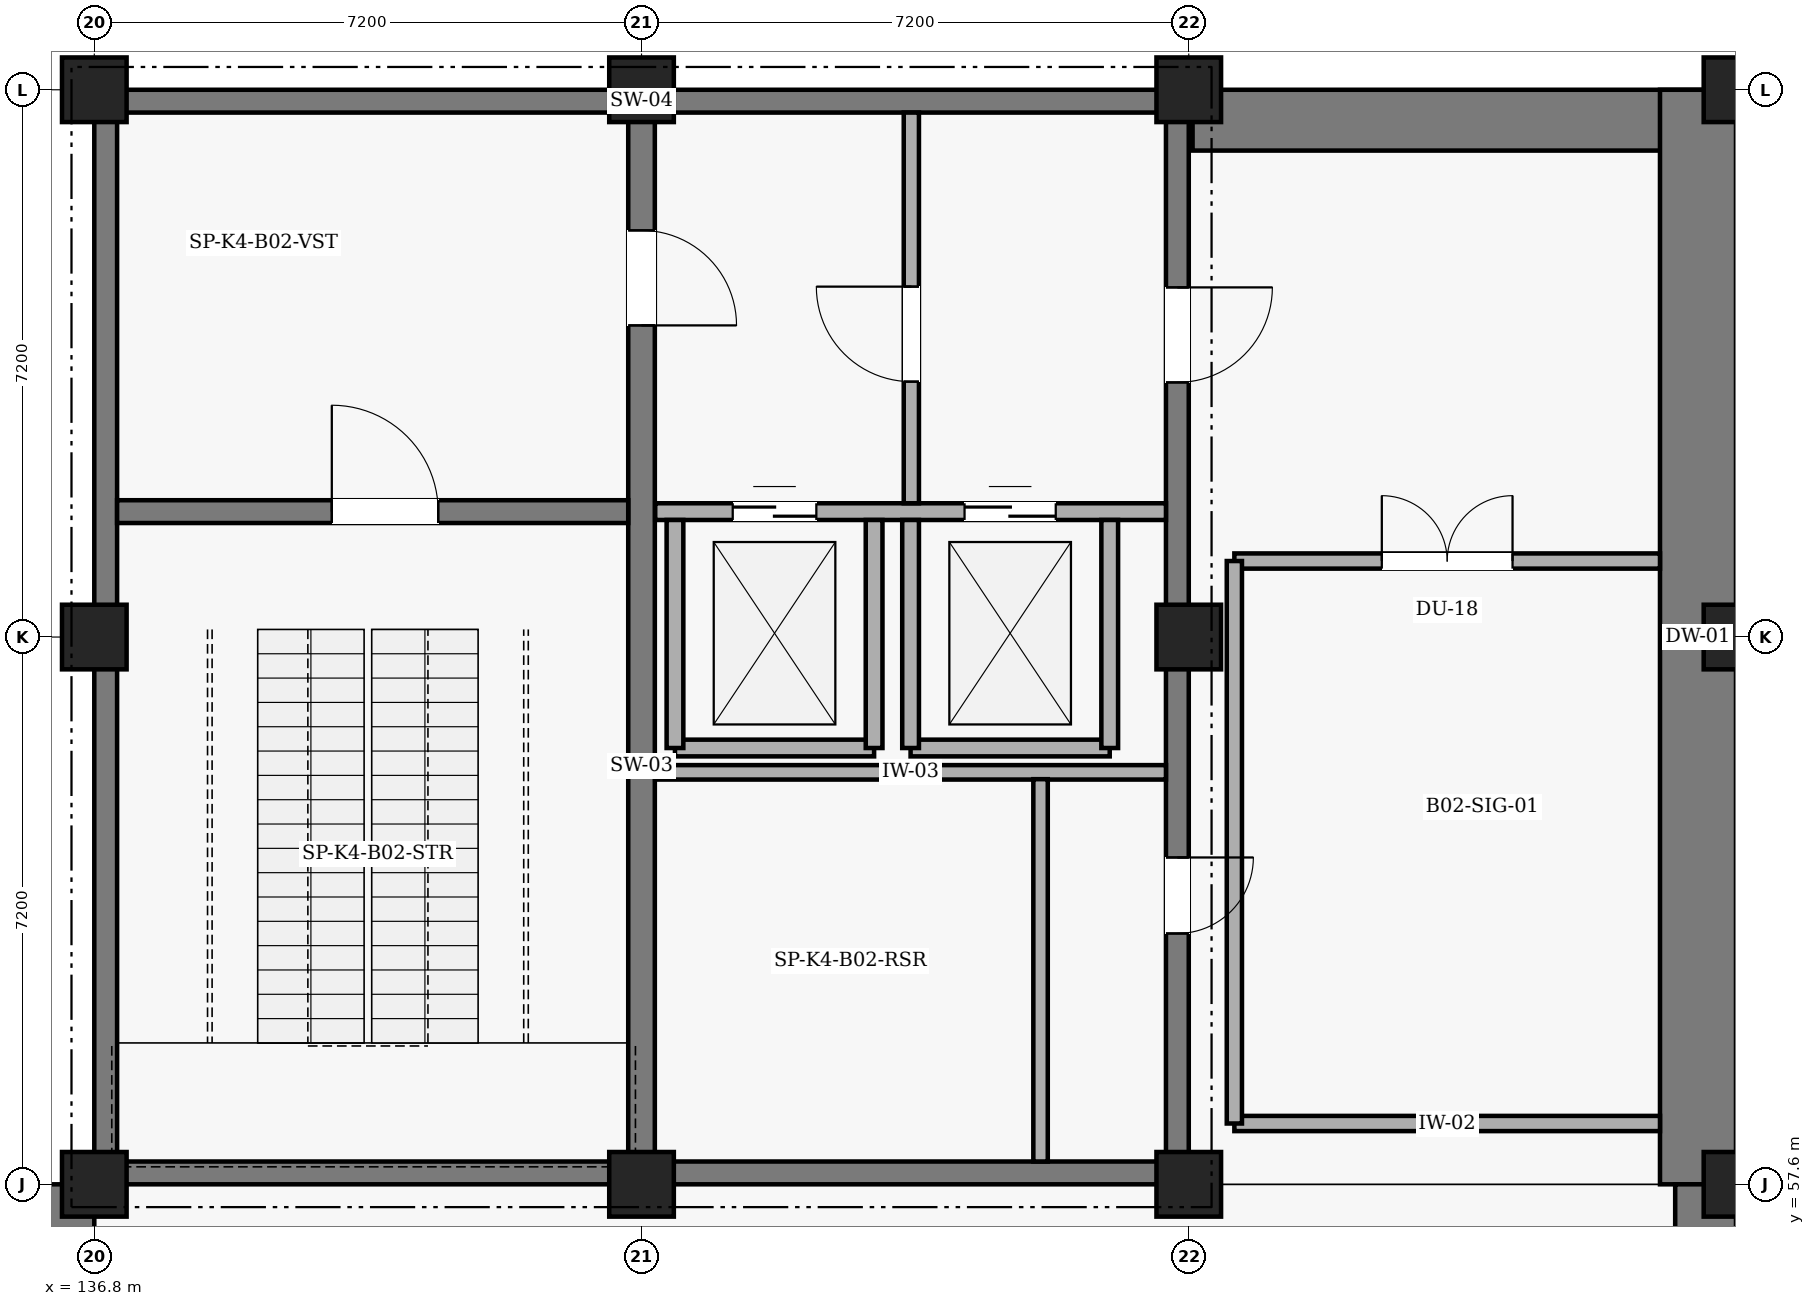
"""IFC4 building model, lengths in metres.
Left out: names, types, materials, properties, quantities, classifications, styles, units other than length and angle.
Written with IfcOpenShell. Run it as: python <this file> out.ifc"""

import sys

from ifc_helpers import new_model, si_unit, direction, frame, frame_2d, origin, origin_2d, place, context, subcontext, project, spatial, rectangle, extrude, element, fill, save


model = new_model("IFC4")
c1 = context("Model", 3, precision=1e-05, world=origin(), true_north=direction((0.0, 1.0)))
c2 = subcontext(c1, "Body", "Model", "MODEL_VIEW")
j1 = project(units=[si_unit("LENGTHUNIT", "METRE"), si_unit("PLANEANGLEUNIT", "RADIAN")], contexts=[c1])
p1 = place(None, origin())
s1 = spatial("IfcSite", under=j1, at=p1, CompositionType="ELEMENT")
p2 = place(p1, origin())
s2 = spatial("IfcBuilding", under=s1, at=p2, CompositionType="ELEMENT")
p3 = place(p2, frame((0.0, 0.0, -10.8)))
s3 = spatial("IfcBuildingStorey", under=s2, at=p3, CompositionType="ELEMENT", Elevation=-10.8)
p4 = place(p3, frame((123.3, 57.2, 0.0), z_axis=(0.0, 0.0, 1.0), x_axis=(1.0, 0.0, 0.0)))
e1 = element("IfcWall", 1, at=p4, inside=s3, PredefinedType="USERDEFINED", context=c2, shape_type="SweptSolid", body=[
    extrude(rectangle(XDim=13.5, YDim=0.8, at=frame_2d((6.75, 0.0))), origin(), (0.0, 0.0, 1.0), 5.0),
])
p5 = place(p3, frame((151.25, 71.6, 0.0), z_axis=(0.0, 0.0, 1.0), x_axis=(1.0, 0.0, 0.0)))
e2 = element("IfcWall", 2, at=p5, inside=s3, PredefinedType="USERDEFINED", context=c2, shape_type="SweptSolid", body=[
    extrude(rectangle(XDim=7.15, YDim=0.8, at=frame_2d((3.575, 0.0))), origin(), (0.0, 0.0, 1.0), 5.0),
])
p6 = place(p3, frame((157.9, 72.0, 0.0), z_axis=(0.0, 0.0, 1.0), x_axis=(0.0, -1.0, 0.0)))
e3 = element("IfcWall", 3, at=p6, inside=s3, PredefinedType="USERDEFINED", context=c2, shape_type="SweptSolid", body=[
    extrude(rectangle(XDim=14.4, YDim=1.0, at=frame_2d((7.2, 0.0))), origin(), (0.0, 0.0, 1.0), 5.0),
])
p7 = place(p3, frame((158.0, 57.6, 0.0), z_axis=(0.0, 0.0, 1.0), x_axis=(0.0, -1.0, 0.0)))
e4 = element("IfcWall", 4, at=p7, inside=s3, PredefinedType="USERDEFINED", context=c2, shape_type="SweptSolid", body=[
    extrude(rectangle(XDim=14.4, YDim=0.8, at=frame_2d((7.2, 0.0))), origin(), (0.0, 0.0, 1.0), 5.0),
])
p8 = place(p3, frame((136.8, 71.85, 0.0), z_axis=(0.0, 0.0, 1.0), x_axis=(1.0, 0.0, 0.0)))
e5 = element("IfcWall", 5, at=p8, inside=s3, PredefinedType="SHEAR", context=c2, shape_type="SweptSolid", body=[
    extrude(rectangle(XDim=14.4, YDim=0.3, at=frame_2d((7.2, 0.0))), origin(), (0.0, 0.0, 1.0), 5.4),
])
p9 = place(p3, frame((151.05, 71.7, 0.0), z_axis=(0.0, 0.0, 1.0), x_axis=(0.0, -1.0, 0.0)))
e6 = element("IfcWall", 6, at=p9, inside=s3, PredefinedType="SHEAR", context=c2, shape_type="SweptSolid", body=[
    extrude(rectangle(XDim=13.8, YDim=0.3, at=frame_2d((6.9, 0.0))), origin(), (0.0, 0.0, 1.0), 5.4),
])
p10 = place(p9, frame((9.8, 0.0, 0.0)))
e7 = element("IfcOpeningElement", 7, at=p10, cuts=e6, PredefinedType="OPENING", context=c2, shape_type="SweptSolid", body=[
    extrude(rectangle(XDim=1.0, YDim=2.15, at=frame_2d((0.5, 1.075))), frame((0.0, 0.16, 0.0), z_axis=(0.0, -1.0, 0.0), x_axis=(1.0, 0.0, 0.0)), (0.0, 0.0, 1.0), 0.32),
])
p11 = place(p9, frame((2.3, 0.0, 0.0)))
e8 = element("IfcOpeningElement", 8, at=p11, cuts=e6, PredefinedType="OPENING", context=c2, shape_type="SweptSolid", body=[
    extrude(rectangle(XDim=1.25, YDim=2.2, at=frame_2d((0.625, 1.1))), frame((0.0, 0.16, 0.0), z_axis=(0.0, -1.0, 0.0), x_axis=(1.0, 0.0, 0.0)), (0.0, 0.0, 1.0), 0.32),
])
p12 = place(p3, frame((151.2, 57.75, 0.0), z_axis=(0.0, 0.0, 1.0), x_axis=(-1.0, 0.0, 0.0)))
e9 = element("IfcWall", 9, at=p12, inside=s3, PredefinedType="SHEAR", context=c2, shape_type="SweptSolid", body=[
    extrude(rectangle(XDim=14.4, YDim=0.3, at=frame_2d((7.2, 0.0))), origin(), (0.0, 0.0, 1.0), 5.4),
])
p13 = place(p3, frame((136.95, 57.9, 0.0), z_axis=(0.0, 0.0, 1.0), x_axis=(0.0, 1.0, 0.0)))
e10 = element("IfcWall", 10, at=p13, inside=s3, PredefinedType="SHEAR", context=c2, shape_type="SweptSolid", body=[
    extrude(rectangle(XDim=13.8, YDim=0.3, at=frame_2d((6.9, 0.0))), origin(), (0.0, 0.0, 1.0), 5.4),
])
p14 = place(p3, frame((144.0, 71.7, 0.0), z_axis=(0.0, 0.0, 1.0), x_axis=(0.0, -1.0, 0.0)))
e11 = element("IfcWall", 11, at=p14, inside=s3, PredefinedType="SHEAR", context=c2, shape_type="SweptSolid", body=[
    extrude(rectangle(XDim=13.8, YDim=0.35, at=frame_2d((6.9, 0.0))), origin(), (0.0, 0.0, 1.0), 5.4),
])
p15 = place(p14, frame((1.55, 0.0, 0.0)))
e12 = element("IfcOpeningElement", 12, at=p15, cuts=e11, PredefinedType="OPENING", context=c2, shape_type="SweptSolid", body=[
    extrude(rectangle(XDim=1.25, YDim=2.2, at=frame_2d((0.625, 1.1))), frame((0.0, 0.185, 0.0), z_axis=(0.0, -1.0, 0.0), x_axis=(1.0, 0.0, 0.0)), (0.0, 0.0, 1.0), 0.37),
])
p16 = place(p3, frame((137.1, 66.45, 0.0), z_axis=(0.0, 0.0, 1.0), x_axis=(1.0, 0.0, 0.0)))
e13 = element("IfcWall", 13, at=p16, inside=s3, PredefinedType="SHEAR", context=c2, shape_type="SweptSolid", body=[
    extrude(rectangle(XDim=6.725, YDim=0.3, at=frame_2d((3.362, 0.0))), origin(), (0.0, 0.0, 1.0), 5.4),
])
p17 = place(p16, frame((2.825, 0.0, 0.0)))
e14 = element("IfcOpeningElement", 14, at=p17, cuts=e13, PredefinedType="OPENING", context=c2, shape_type="SweptSolid", body=[
    extrude(rectangle(XDim=1.4, YDim=2.2, at=frame_2d((0.7, 1.1))), frame((0.0, 0.16, 0.0), z_axis=(0.0, -1.0, 0.0), x_axis=(1.0, 0.0, 0.0)), (0.0, 0.0, 1.0), 0.32),
])
for number, where, z_axis, x_axis in (
    (15, (136.8, 57.6, 0.0), (0.0, 0.0, 1.0), (1.0, 0.0, 0.0)),
    (16, (136.8, 64.8, 0.0), (0.0, 0.0, 1.0), (1.0, 0.0, 0.0)),
    (17, (136.8, 72.0, 0.0), (0.0, 0.0, 1.0), (1.0, 0.0, 0.0)),
    (18, (144.0, 57.6, 0.0), (0.0, 0.0, 1.0), (1.0, 0.0, 0.0)),
    (19, (144.0, 72.0, 0.0), (0.0, 0.0, 1.0), (1.0, 0.0, 0.0)),
    (20, (151.2, 57.6, 0.0), (0.0, 0.0, 1.0), (1.0, 0.0, 0.0)),
    (21, (151.2, 64.8, 0.0), (0.0, 0.0, 1.0), (1.0, 0.0, 0.0)),
    (22, (151.2, 72.0, 0.0), (0.0, 0.0, 1.0), (1.0, 0.0, 0.0)),
    (23, (158.4, 57.6, 0.0), (0.0, 0.0, 1.0), (1.0, 0.0, 0.0)),
    (24, (158.4, 64.8, 0.0), (0.0, 0.0, 1.0), (1.0, 0.0, 0.0)),
    (25, (158.4, 72.0, 0.0), (0.0, 0.0, 1.0), (1.0, 0.0, 0.0)),
):
    element("IfcColumn", number, at=place(p3, frame(where, z_axis=z_axis, x_axis=x_axis)), inside=s3, PredefinedType="COLUMN", context=c2, shape_type="SweptSolid", body=[
        extrude(rectangle(XDim=0.85, YDim=0.85, at=origin_2d()), origin(), (0.0, 0.0, 1.0), 5.0),
    ])
p18 = place(p3, frame((144.18, 63.02, 0.0), z_axis=(0.0, 0.0, 1.0), x_axis=(1.0, 0.0, 0.0)))
e26 = element("IfcWall", 26, at=p18, inside=s3, PredefinedType="PARTITIONING", context=c2, shape_type="SweptSolid", body=[
    extrude(rectangle(XDim=6.72, YDim=0.19, at=frame_2d((3.36, 0.0))), origin(), (0.0, 0.0, 1.0), 5.05),
])
p19 = place(p3, frame((149.25, 57.9, 0.0), z_axis=(0.0, 0.0, 1.0), x_axis=(0.0, 1.0, 0.0)))
e27 = element("IfcWall", 27, at=p19, inside=s3, PredefinedType="PARTITIONING", context=c2, shape_type="SweptSolid", body=[
    extrude(rectangle(XDim=5.03, YDim=0.19, at=frame_2d((2.515, 0.0))), origin(), (0.0, 0.0, 1.0), 5.05),
])
p20 = place(p3, frame((144.18, 66.45, 0.0), z_axis=(0.0, 0.0, 1.0), x_axis=(1.0, 0.0, 0.0)))
e28 = element("IfcWall", 28, at=p20, inside=s3, PredefinedType="PARTITIONING", context=c2, shape_type="SweptSolid", body=[
    extrude(rectangle(XDim=6.72, YDim=0.22, at=frame_2d((3.36, 0.0))), origin(), (0.0, 0.0, 1.0), 5.05),
])
p21 = place(p20, frame((1.02, 0.0, 0.0)))
e29 = element("IfcOpeningElement", 29, at=p21, cuts=e28, PredefinedType="OPENING", context=c2, shape_type="SweptSolid", body=[
    extrude(rectangle(XDim=1.1, YDim=2.15, at=frame_2d((0.55, 1.075))), frame((0.0, 0.12, 0.0), z_axis=(0.0, -1.0, 0.0), x_axis=(1.0, 0.0, 0.0)), (0.0, 0.0, 1.0), 0.24),
])
p22 = place(p20, frame((4.07, 0.0, 0.0)))
e30 = element("IfcOpeningElement", 30, at=p22, cuts=e28, PredefinedType="OPENING", context=c2, shape_type="SweptSolid", body=[
    extrude(rectangle(XDim=1.2, YDim=2.15, at=frame_2d((0.6, 1.075))), frame((0.0, 0.12, 0.0), z_axis=(0.0, -1.0, 0.0), x_axis=(1.0, 0.0, 0.0)), (0.0, 0.0, 1.0), 0.24),
])
p23 = place(p3, frame((144.44, 63.34, 0.0), z_axis=(0.0, 0.0, 1.0), x_axis=(1.0, 0.0, 0.0)))
e31 = element("IfcWall", 31, at=p23, inside=s3, PredefinedType="PARTITIONING", context=c2, shape_type="SweptSolid", body=[
    extrude(rectangle(XDim=2.62, YDim=0.22, at=frame_2d((1.31, 0.0))), origin(), (0.0, 0.0, 1.0), 5.05),
])
for number, where, z_axis, x_axis in (
    (32, (144.44, 63.34, 0.0), (0.0, 0.0, 1.0), (0.0, 1.0, 0.0)),
    (33, (147.06, 63.34, 0.0), (0.0, 0.0, 1.0), (0.0, 1.0, 0.0)),
):
    element("IfcWall", number, at=place(p3, frame(where, z_axis=z_axis, x_axis=x_axis)), inside=s3, PredefinedType="PARTITIONING", context=c2, shape_type="SweptSolid", body=[
        extrude(rectangle(XDim=3.0, YDim=0.22, at=frame_2d((1.5, 0.0))), origin(), (0.0, 0.0, 1.0), 5.05),
    ])
p24 = place(p3, frame((147.54, 63.34, 0.0), z_axis=(0.0, 0.0, 1.0), x_axis=(1.0, 0.0, 0.0)))
e34 = element("IfcWall", 34, at=p24, inside=s3, PredefinedType="PARTITIONING", context=c2, shape_type="SweptSolid", body=[
    extrude(rectangle(XDim=2.62, YDim=0.22, at=frame_2d((1.31, 0.0))), origin(), (0.0, 0.0, 1.0), 5.05),
])
for number, where, z_axis, x_axis in (
    (35, (147.54, 63.34, 0.0), (0.0, 0.0, 1.0), (0.0, 1.0, 0.0)),
    (36, (150.16, 63.34, 0.0), (0.0, 0.0, 1.0), (0.0, 1.0, 0.0)),
):
    element("IfcWall", number, at=place(p3, frame(where, z_axis=z_axis, x_axis=x_axis)), inside=s3, PredefinedType="PARTITIONING", context=c2, shape_type="SweptSolid", body=[
        extrude(rectangle(XDim=3.0, YDim=0.22, at=frame_2d((1.5, 0.0))), origin(), (0.0, 0.0, 1.0), 5.05),
    ])
p25 = place(p3, frame((147.55, 66.56, 0.0), z_axis=(0.0, 0.0, 1.0), x_axis=(0.0, 1.0, 0.0)))
e37 = element("IfcWall", 37, at=p25, inside=s3, PredefinedType="PARTITIONING", context=c2, shape_type="SweptSolid", body=[
    extrude(rectangle(XDim=5.14, YDim=0.2, at=frame_2d((2.57, 0.0))), origin(), (0.0, 0.0, 1.0), 5.05),
])
p26 = place(p25, frame((1.6, 0.0, 0.0)))
e38 = element("IfcOpeningElement", 38, at=p26, cuts=e37, PredefinedType="OPENING", context=c2, shape_type="SweptSolid", body=[
    extrude(rectangle(XDim=1.25, YDim=2.2, at=frame_2d((0.625, 1.1))), frame((0.0, 0.11, 0.0), z_axis=(0.0, -1.0, 0.0), x_axis=(1.0, 0.0, 0.0)), (0.0, 0.0, 1.0), 0.22),
])
p27 = place(p3, frame((151.8, 65.8, 0.0), z_axis=(0.0, 0.0, 1.0), x_axis=(1.0, 0.0, 0.0)))
e39 = element("IfcWall", 39, at=p27, inside=s3, PredefinedType="PARTITIONING", context=c2, shape_type="SweptSolid", body=[
    extrude(rectangle(XDim=5.6, YDim=0.2, at=frame_2d((2.8, 0.0))), origin(), (0.0, 0.0, 1.0), 5.05),
])
p28 = place(p27, frame((1.94, 0.0, 0.0)))
e40 = element("IfcOpeningElement", 40, at=p28, cuts=e39, PredefinedType="OPENING", context=c2, shape_type="SweptSolid", body=[
    extrude(rectangle(XDim=1.72, YDim=2.22, at=frame_2d((0.86, 1.11))), frame((0.0, 0.11, 0.0), z_axis=(0.0, -1.0, 0.0), x_axis=(1.0, 0.0, 0.0)), (0.0, 0.0, 1.0), 0.22),
])
p29 = place(p3, frame((157.4, 58.4, 0.0), z_axis=(0.0, 0.0, 1.0), x_axis=(-1.0, 0.0, 0.0)))
e41 = element("IfcWall", 41, at=p29, inside=s3, PredefinedType="PARTITIONING", context=c2, shape_type="SweptSolid", body=[
    extrude(rectangle(XDim=5.6, YDim=0.2, at=frame_2d((2.8, 0.0))), origin(), (0.0, 0.0, 1.0), 5.05),
])
p30 = place(p3, frame((151.8, 58.4, 0.0), z_axis=(0.0, 0.0, 1.0), x_axis=(0.0, 1.0, 0.0)))
e42 = element("IfcWall", 42, at=p30, inside=s3, PredefinedType="PARTITIONING", context=c2, shape_type="SweptSolid", body=[
    extrude(rectangle(XDim=7.4, YDim=0.2, at=frame_2d((3.7, 0.0))), origin(), (0.0, 0.0, 1.0), 4.12),
])
p31 = place(p17, origin())
e43 = element("IfcDoor", 43, at=p31, inside=s3, OperationType="SINGLE_SWING_LEFT", PredefinedType="DOOR", context=c2, shape_type="SweptSolid", body=[
    extrude(rectangle(XDim=1.4, YDim=2.2, at=frame_2d((0.7, 1.1))), frame((0.0, 0.025, 0.0), z_axis=(0.0, -1.0, 0.0), x_axis=(1.0, 0.0, 0.0)), (0.0, 0.0, 1.0), 0.05),
])
fill(e14, e43)
p32 = place(p15, origin())
e44 = element("IfcDoor", 44, at=p32, inside=s3, OperationType="SINGLE_SWING_RIGHT", PredefinedType="DOOR", context=c2, shape_type="SweptSolid", body=[
    extrude(rectangle(XDim=1.25, YDim=2.2, at=frame_2d((0.625, 1.1))), frame((0.0, 0.025, 0.0), z_axis=(0.0, -1.0, 0.0), x_axis=(1.0, 0.0, 0.0)), (0.0, 0.0, 1.0), 0.05),
])
fill(e12, e44)
p33 = place(p10, origin())
e45 = element("IfcDoor", 45, at=p33, inside=s3, OperationType="SINGLE_SWING_LEFT", PredefinedType="DOOR", context=c2, shape_type="SweptSolid", body=[
    extrude(rectangle(XDim=1.0, YDim=2.15, at=frame_2d((0.5, 1.075))), frame((0.0, 0.025, 0.0), z_axis=(0.0, -1.0, 0.0), x_axis=(1.0, 0.0, 0.0)), (0.0, 0.0, 1.0), 0.05),
])
fill(e7, e45)
p34 = place(p21, origin())
e46 = element("IfcDoor", 46, at=p34, inside=s3, OperationType="DOUBLE_DOOR_SLIDING", PredefinedType="DOOR", context=c2, shape_type="SweptSolid", body=[
    extrude(rectangle(XDim=1.1, YDim=2.15, at=frame_2d((0.55, 1.075))), frame((0.0, 0.025, 0.0), z_axis=(0.0, -1.0, 0.0), x_axis=(1.0, 0.0, 0.0)), (0.0, 0.0, 1.0), 0.05),
])
fill(e29, e46)
p35 = place(p22, origin())
e47 = element("IfcDoor", 47, at=p35, inside=s3, OperationType="DOUBLE_DOOR_SLIDING", PredefinedType="DOOR", context=c2, shape_type="SweptSolid", body=[
    extrude(rectangle(XDim=1.2, YDim=2.15, at=frame_2d((0.6, 1.075))), frame((0.0, 0.025, 0.0), z_axis=(0.0, -1.0, 0.0), x_axis=(1.0, 0.0, 0.0)), (0.0, 0.0, 1.0), 0.05),
])
fill(e30, e47)
p36 = place(p26, origin())
e48 = element("IfcDoor", 48, at=p36, inside=s3, OperationType="SINGLE_SWING_RIGHT", PredefinedType="DOOR", context=c2, shape_type="SweptSolid", body=[
    extrude(rectangle(XDim=1.25, YDim=2.2, at=frame_2d((0.625, 1.1))), frame((0.0, 0.025, 0.0), z_axis=(0.0, -1.0, 0.0), x_axis=(1.0, 0.0, 0.0)), (0.0, 0.0, 1.0), 0.05),
])
fill(e38, e48)
p37 = place(p11, origin())
e49 = element("IfcDoor", 49, at=p37, inside=s3, OperationType="SINGLE_SWING_LEFT", PredefinedType="DOOR", context=c2, shape_type="SweptSolid", body=[
    extrude(rectangle(XDim=1.25, YDim=2.2, at=frame_2d((0.625, 1.1))), frame((0.0, 0.025, 0.0), z_axis=(0.0, -1.0, 0.0), x_axis=(1.0, 0.0, 0.0)), (0.0, 0.0, 1.0), 0.05),
])
fill(e8, e49)
p38 = place(p28, origin())
e50 = element("IfcDoor", 50, at=p38, inside=s3, OperationType="DOUBLE_DOOR_SINGLE_SWING", PredefinedType="DOOR", context=c2, shape_type="SweptSolid", body=[
    extrude(rectangle(XDim=1.72, YDim=2.22, at=frame_2d((0.86, 1.11))), frame((0.0, 0.025, 0.0), z_axis=(0.0, -1.0, 0.0), x_axis=(1.0, 0.0, 0.0)), (0.0, 0.0, 1.0), 0.05),
])
fill(e40, e50)
save(model, sys.argv[1])
